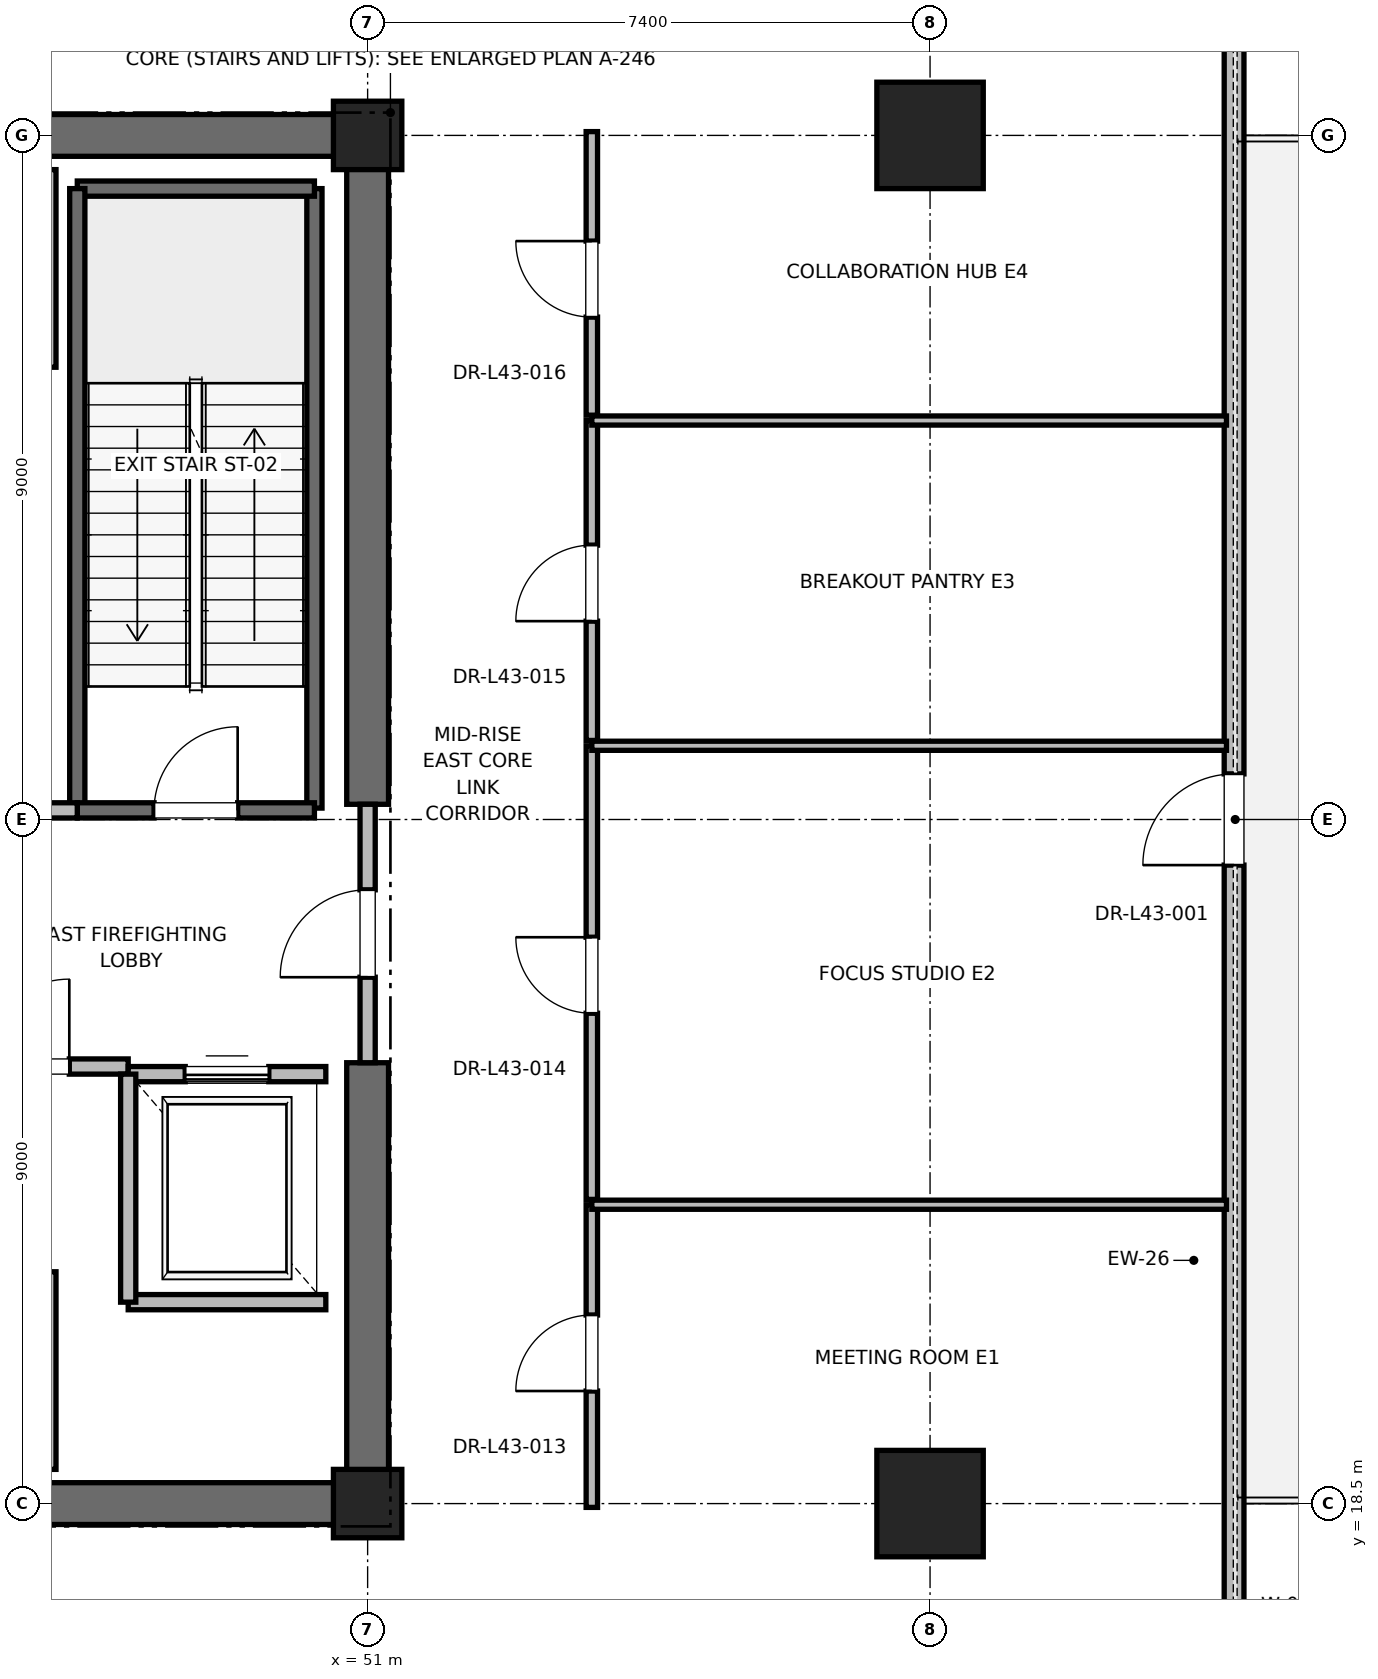
"""IFC4 building model, lengths in metres.
Left out: names, types, materials, properties, quantities, classifications, styles, units other than length and angle.
Written with IfcOpenShell. Run it as: python <this file> out.ifc"""

import sys

from ifc_helpers import new_model, si_unit, direction, frame, frame_2d, origin, origin_2d, place, context, subcontext, project, spatial, rectangle, extrude, element, fill, save


model = new_model("IFC4")
c1 = context("Model", 3, precision=1e-05, world=origin(), true_north=direction((0.0, 1.0)))
c2 = subcontext(c1, "Body", "Model", "MODEL_VIEW")
j1 = project(units=[si_unit("LENGTHUNIT", "METRE"), si_unit("PLANEANGLEUNIT", "RADIAN")], contexts=[c1])
p1 = place(None, origin())
s1 = spatial("IfcSite", under=j1, at=p1, CompositionType="ELEMENT")
p2 = place(p1, origin())
s2 = spatial("IfcBuilding", under=s1, at=p2, CompositionType="ELEMENT")
p3 = place(p2, frame((0.0, 0.0, 184.4)))
s3 = spatial("IfcBuildingStorey", under=s2, at=p3, CompositionType="ELEMENT", Elevation=184.4)
for number, where, z_axis, x_axis in (
    (1, (58.4, 18.5, 0.0), (0.0, 0.0, 1.0), (1.0, 0.0, 0.0)),
    (2, (58.4, 36.5, 0.0), (0.0, 0.0, 1.0), (1.0, 0.0, 0.0)),
):
    element("IfcColumn", number, at=place(p3, frame(where, z_axis=z_axis, x_axis=x_axis)), inside=s3, PredefinedType="COLUMN", context=c2, shape_type="SweptSolid", body=[
        extrude(rectangle(XDim=1.4, YDim=1.4, at=origin_2d()), origin(), (0.0, 0.0, 1.0), 5.0),
    ])
for number, where, z_axis, x_axis in (
    (3, (51.0, 18.5, 0.0), (0.0, 0.0, 1.0), (1.0, 0.0, 0.0)),
    (4, (51.0, 36.5, 0.0), (0.0, 0.0, 1.0), (1.0, 0.0, 0.0)),
):
    element("IfcColumn", number, at=place(p3, frame(where, z_axis=z_axis, x_axis=x_axis)), inside=s3, PredefinedType="PILASTER", context=c2, shape_type="SweptSolid", body=[
        extrude(rectangle(XDim=0.9, YDim=0.9, at=origin_2d()), origin(), (0.0, 0.0, 1.0), 5.0),
    ])
p4 = place(p3, frame((41.8, 18.5, 0.0), z_axis=(0.0, 0.0, 1.0), x_axis=(1.0, 0.0, 0.0)))
e5 = element("IfcWall", 5, at=p4, inside=s3, PredefinedType="SHEAR", context=c2, shape_type="SweptSolid", body=[
    extrude(rectangle(XDim=9.2, YDim=0.55, at=frame_2d((4.6, 0.0))), origin(), (0.0, 0.0, 1.0), 4.7),
])
for number, where, z_axis, x_axis in (
    (6, (45.2, 36.5, 0.0), (0.0, 0.0, 1.0), (1.0, 0.0, 0.0)),
    (7, (51.0, 18.5, 0.0), (0.0, 0.0, 1.0), (0.0, 1.0, 0.0)),
):
    element("IfcWall", number, at=place(p3, frame(where, z_axis=z_axis, x_axis=x_axis)), inside=s3, PredefinedType="SHEAR", context=c2, shape_type="SweptSolid", body=[
        extrude(rectangle(XDim=5.8, YDim=0.55, at=frame_2d((2.9, 0.0))), origin(), (0.0, 0.0, 1.0), 4.7),
    ])
p5 = place(p3, frame((51.0, 27.7, 0.0), z_axis=(0.0, 0.0, 1.0), x_axis=(0.0, 1.0, 0.0)))
e8 = element("IfcWall", 8, at=p5, inside=s3, PredefinedType="SHEAR", context=c2, shape_type="SweptSolid", body=[
    extrude(rectangle(XDim=8.8, YDim=0.55, at=frame_2d((4.4, 0.0))), origin(), (0.0, 0.0, 1.0), 4.7),
])
p6 = place(p3, frame((62.4, 10.3, 0.0), z_axis=(0.0, 0.0, 1.0), x_axis=(0.0, 1.0, 0.0)))
e9 = element("IfcWall", 9, at=p6, inside=s3, PredefinedType="PARAPET", context=c2, shape_type="SweptSolid", body=[
    extrude(rectangle(XDim=34.4, YDim=0.26, at=frame_2d((17.2, 0.0))), origin(), (0.0, 0.0, 1.0), 3.753),
])
p7 = place(p6, frame((4.2, 0.0, 0.85)))
e10 = element("IfcOpeningElement", 10, at=p7, cuts=e9, PredefinedType="OPENING", context=c2, shape_type="SweptSolid", body=[
    extrude(rectangle(XDim=2.0, YDim=2.3, at=frame_2d((1.0, 1.15))), frame((0.0, 0.13, 0.0), z_axis=(0.0, -1.0, 0.0), x_axis=(1.0, 0.0, 0.0)), (0.0, 0.0, 1.0), 0.26),
])
p8 = place(p6, frame((16.6, 0.0, 0.0)))
e11 = element("IfcOpeningElement", 11, at=p8, cuts=e9, PredefinedType="OPENING", context=c2, shape_type="SweptSolid", body=[
    extrude(rectangle(XDim=1.2, YDim=2.2, at=frame_2d((0.6, 1.1))), frame((0.0, 0.13, 0.0), z_axis=(0.0, -1.0, 0.0), x_axis=(1.0, 0.0, 0.0)), (0.0, 0.0, 1.0), 0.26),
])
p9 = place(p6, frame((28.2, 0.0, 0.85)))
e12 = element("IfcOpeningElement", 12, at=p9, cuts=e9, PredefinedType="OPENING", context=c2, shape_type="SweptSolid", body=[
    extrude(rectangle(XDim=2.0, YDim=2.3, at=frame_2d((1.0, 1.15))), frame((0.0, 0.13, 0.0), z_axis=(0.0, -1.0, 0.0), x_axis=(1.0, 0.0, 0.0)), (0.0, 0.0, 1.0), 0.26),
])
p10 = place(p3, frame((50.3, 27.65, 0.0), z_axis=(0.0, 0.0, 1.0), x_axis=(0.0, 1.0, 0.0)))
e13 = element("IfcWall", 13, at=p10, inside=s3, PredefinedType="SOLIDWALL", context=c2, shape_type="SweptSolid", body=[
    extrude(rectangle(XDim=8.15, YDim=0.2, at=frame_2d((4.075, 0.0))), origin(), (0.0, 0.0, 1.0), 4.7),
])
p11 = place(p3, frame((47.18, 35.8, 0.0), z_axis=(0.0, 0.0, 1.0), x_axis=(1.0, 0.0, 0.0)))
e14 = element("IfcWall", 14, at=p11, inside=s3, PredefinedType="SOLIDWALL", context=c2, shape_type="SweptSolid", body=[
    extrude(rectangle(XDim=3.12, YDim=0.2, at=frame_2d((1.56, 0.0))), origin(), (0.0, 0.0, 1.0), 4.7),
])
p12 = place(p3, frame((47.18, 27.62, 0.0), z_axis=(0.0, 0.0, 1.0), x_axis=(0.0, 1.0, 0.0)))
e15 = element("IfcWall", 15, at=p12, inside=s3, PredefinedType="SOLIDWALL", context=c2, shape_type="SweptSolid", body=[
    extrude(rectangle(XDim=8.18, YDim=0.2, at=frame_2d((4.09, 0.0))), origin(), (0.0, 0.0, 1.0), 4.7),
])
p13 = place(p3, frame((47.18, 27.62, 0.0), z_axis=(0.0, 0.0, 1.0), x_axis=(1.0, 0.0, 0.0)))
e16 = element("IfcWall", 16, at=p13, inside=s3, PredefinedType="SOLIDWALL", context=c2, shape_type="SweptSolid", body=[
    extrude(rectangle(XDim=3.12, YDim=0.2, at=frame_2d((1.56, 0.0))), origin(), (0.0, 0.0, 1.0), 4.7),
])
p14 = place(p13, frame((1.01, 0.0, 0.0)))
e17 = element("IfcOpeningElement", 17, at=p14, cuts=e16, PredefinedType="OPENING", context=c2, shape_type="SweptSolid", body=[
    extrude(rectangle(XDim=1.1, YDim=2.15, at=frame_2d((0.55, 1.075))), frame((0.0, 0.1, 0.0), z_axis=(0.0, -1.0, 0.0), x_axis=(1.0, 0.0, 0.0)), (0.0, 0.0, 1.0), 0.2),
])
p15 = place(p3, frame((45.15, 24.25, 0.0), z_axis=(0.0, 0.0, 1.0), x_axis=(1.0, 0.0, 0.0)))
e18 = element("IfcWall", 18, at=p15, inside=s3, PredefinedType="PARTITIONING", context=c2, shape_type="SweptSolid", body=[
    extrude(rectangle(XDim=2.7, YDim=0.2, at=frame_2d((1.35, 0.0))), origin(), (0.0, 0.0, 1.0), 4.7),
])
p16 = place(p15, frame((0.775, 0.0, 0.0)))
e19 = element("IfcOpeningElement", 19, at=p16, cuts=e18, PredefinedType="OPENING", context=c2, shape_type="SweptSolid", body=[
    extrude(rectangle(XDim=1.15, YDim=2.2, at=frame_2d((0.575, 1.1))), frame((0.0, 0.1, 0.0), z_axis=(0.0, -1.0, 0.0), x_axis=(1.0, 0.0, 0.0)), (0.0, 0.0, 1.0), 0.2),
])
p17 = place(p3, frame((45.15, 27.62, 0.0), z_axis=(0.0, 0.0, 1.0), x_axis=(1.0, 0.0, 0.0)))
e20 = element("IfcWall", 20, at=p17, inside=s3, PredefinedType="PARTITIONING", context=c2, shape_type="SweptSolid", body=[
    extrude(rectangle(XDim=2.03, YDim=0.2, at=frame_2d((1.015, 0.0))), origin(), (0.0, 0.0, 1.0), 4.7),
])
p18 = place(p17, frame((0.44, 0.0, 0.0)))
e21 = element("IfcOpeningElement", 21, at=p18, cuts=e20, PredefinedType="OPENING", context=c2, shape_type="SweptSolid", body=[
    extrude(rectangle(XDim=1.15, YDim=2.2, at=frame_2d((0.575, 1.1))), frame((0.0, 0.1, 0.0), z_axis=(0.0, -1.0, 0.0), x_axis=(1.0, 0.0, 0.0)), (0.0, 0.0, 1.0), 0.2),
])
p19 = place(p3, frame((51.0, 24.3, 0.0), z_axis=(0.0, 0.0, 1.0), x_axis=(0.0, 1.0, 0.0)))
e22 = element("IfcWall", 22, at=p19, inside=s3, PredefinedType="PARTITIONING", context=c2, shape_type="SweptSolid", body=[
    extrude(rectangle(XDim=3.4, YDim=0.2, at=frame_2d((1.7, 0.0))), origin(), (0.0, 0.0, 1.0), 3.68),
])
p20 = place(p19, frame((1.125, 0.0, 0.0)))
e23 = element("IfcOpeningElement", 23, at=p20, cuts=e22, PredefinedType="OPENING", context=c2, shape_type="SweptSolid", body=[
    extrude(rectangle(XDim=1.15, YDim=2.2, at=frame_2d((0.575, 1.1))), frame((0.0, 0.1, 0.0), z_axis=(0.0, -1.0, 0.0), x_axis=(1.0, 0.0, 0.0)), (0.0, 0.0, 1.0), 0.2),
])
p21 = place(p3, frame((47.85, 21.15, 0.0), z_axis=(0.0, 0.0, 1.0), x_axis=(1.0, 0.0, 0.0)))
e24 = element("IfcWall", 24, at=p21, inside=s3, PredefinedType="SOLIDWALL", context=c2, shape_type="SweptSolid", body=[
    extrude(rectangle(XDim=2.6, YDim=0.2, at=frame_2d((1.3, 0.0))), origin(), (0.0, 0.0, 1.0), 4.7),
])
p22 = place(p3, frame((50.45, 24.15, 0.0), z_axis=(0.0, 0.0, 1.0), x_axis=(-1.0, 0.0, 0.0)))
e25 = element("IfcWall", 25, at=p22, inside=s3, PredefinedType="SOLIDWALL", context=c2, shape_type="SweptSolid", body=[
    extrude(rectangle(XDim=2.6, YDim=0.2, at=frame_2d((1.3, 0.0))), origin(), (0.0, 0.0, 1.0), 3.68),
])
p23 = place(p22, frame((0.75, 0.0, 0.0)))
e26 = element("IfcOpeningElement", 26, at=p23, cuts=e25, PredefinedType="OPENING", context=c2, shape_type="SweptSolid", body=[
    extrude(rectangle(XDim=1.1, YDim=2.2, at=frame_2d((0.55, 1.1))), frame((0.0, 0.1, 0.0), z_axis=(0.0, -1.0, 0.0), x_axis=(1.0, 0.0, 0.0)), (0.0, 0.0, 1.0), 0.2),
])
p24 = place(p3, frame((47.85, 24.15, 0.0), z_axis=(0.0, 0.0, 1.0), x_axis=(0.0, -1.0, 0.0)))
e27 = element("IfcWall", 27, at=p24, inside=s3, PredefinedType="SOLIDWALL", context=c2, shape_type="SweptSolid", body=[
    extrude(rectangle(XDim=3.0, YDim=0.2, at=frame_2d((1.5, 0.0))), origin(), (0.0, 0.0, 1.0), 4.7),
])
for number, where, z_axis, x_axis in (
    (28, (46.8, 18.95, 0.0), (0.0, 0.0, 1.0), (0.0, 1.0, 0.0)),
    (29, (46.8, 33.45, 0.0), (0.0, 0.0, 1.0), (0.0, 1.0, 0.0)),
):
    element("IfcWall", number, at=place(p3, frame(where, z_axis=z_axis, x_axis=x_axis)), inside=s3, PredefinedType="SOLIDWALL", context=c2, shape_type="SweptSolid", body=[
        extrude(rectangle(XDim=2.6, YDim=0.2, at=frame_2d((1.3, 0.0))), origin(), (0.0, 0.0, 1.0), 4.7),
    ])
p25 = place(p3, frame((53.95, 18.45, 0.0), z_axis=(0.0, 0.0, 1.0), x_axis=(0.0, 1.0, 0.0)))
e30 = element("IfcWall", 30, at=p25, inside=s3, PredefinedType="PARTITIONING", context=c2, shape_type="SweptSolid", body=[
    extrude(rectangle(XDim=3.982, YDim=0.15, at=frame_2d((1.991, 0.0))), origin(), (0.0, 0.0, 1.0), 2.85),
])
p26 = place(p25, frame((1.531, 0.0, 0.0)))
e31 = element("IfcOpeningElement", 31, at=p26, cuts=e30, PredefinedType="OPENING", context=c2, shape_type="SweptSolid", body=[
    extrude(rectangle(XDim=1.0, YDim=2.15, at=frame_2d((0.5, 1.075))), frame((0.0, 0.075, 0.0), z_axis=(0.0, -1.0, 0.0), x_axis=(1.0, 0.0, 0.0)), (0.0, 0.0, 1.0), 0.15),
])
p27 = place(p3, frame((53.95, 22.432, 0.0), z_axis=(0.0, 0.0, 1.0), x_axis=(1.0, 0.0, 0.0)))
e32 = element("IfcWall", 32, at=p27, inside=s3, PredefinedType="PARTITIONING", context=c2, shape_type="SweptSolid", body=[
    extrude(rectangle(XDim=8.35, YDim=0.12, at=frame_2d((4.175, 0.0))), origin(), (0.0, 0.0, 1.0), 2.85),
])
p28 = place(p3, frame((53.95, 22.502, 0.0), z_axis=(0.0, 0.0, 1.0), x_axis=(0.0, 1.0, 0.0)))
e33 = element("IfcWall", 33, at=p28, inside=s3, PredefinedType="PARTITIONING", context=c2, shape_type="SweptSolid", body=[
    extrude(rectangle(XDim=5.968, YDim=0.15, at=frame_2d((2.984, 0.0))), origin(), (0.0, 0.0, 1.0), 2.85),
])
p29 = place(p28, frame((2.449, 0.0, 0.0)))
e34 = element("IfcOpeningElement", 34, at=p29, cuts=e33, PredefinedType="OPENING", context=c2, shape_type="SweptSolid", body=[
    extrude(rectangle(XDim=1.0, YDim=2.15, at=frame_2d((0.5, 1.075))), frame((0.0, 0.075, 0.0), z_axis=(0.0, -1.0, 0.0), x_axis=(1.0, 0.0, 0.0)), (0.0, 0.0, 1.0), 0.15),
])
p30 = place(p3, frame((53.95, 28.47, 0.0), z_axis=(0.0, 0.0, 1.0), x_axis=(1.0, 0.0, 0.0)))
e35 = element("IfcWall", 35, at=p30, inside=s3, PredefinedType="PARTITIONING", context=c2, shape_type="SweptSolid", body=[
    extrude(rectangle(XDim=8.35, YDim=0.12, at=frame_2d((4.175, 0.0))), origin(), (0.0, 0.0, 1.0), 2.85),
])
p31 = place(p3, frame((53.95, 28.54, 0.0), z_axis=(0.0, 0.0, 1.0), x_axis=(0.0, 1.0, 0.0)))
e36 = element("IfcWall", 36, at=p31, inside=s3, PredefinedType="PARTITIONING", context=c2, shape_type="SweptSolid", body=[
    extrude(rectangle(XDim=4.209, YDim=0.15, at=frame_2d((2.104, 0.0))), origin(), (0.0, 0.0, 1.0), 2.85),
])
p32 = place(p31, frame((1.57, 0.0, 0.0)))
e37 = element("IfcOpeningElement", 37, at=p32, cuts=e36, PredefinedType="OPENING", context=c2, shape_type="SweptSolid", body=[
    extrude(rectangle(XDim=1.0, YDim=2.15, at=frame_2d((0.5, 1.075))), frame((0.0, 0.075, 0.0), z_axis=(0.0, -1.0, 0.0), x_axis=(1.0, 0.0, 0.0)), (0.0, 0.0, 1.0), 0.15),
])
p33 = place(p3, frame((53.95, 32.749, 0.0), z_axis=(0.0, 0.0, 1.0), x_axis=(1.0, 0.0, 0.0)))
e38 = element("IfcWall", 38, at=p33, inside=s3, PredefinedType="PARTITIONING", context=c2, shape_type="SweptSolid", body=[
    extrude(rectangle(XDim=8.35, YDim=0.12, at=frame_2d((4.175, 0.0))), origin(), (0.0, 0.0, 1.0), 2.85),
])
p34 = place(p3, frame((53.95, 32.819, 0.0), z_axis=(0.0, 0.0, 1.0), x_axis=(0.0, 1.0, 0.0)))
e39 = element("IfcWall", 39, at=p34, inside=s3, PredefinedType="PARTITIONING", context=c2, shape_type="SweptSolid", body=[
    extrude(rectangle(XDim=3.731, YDim=0.15, at=frame_2d((1.865, 0.0))), origin(), (0.0, 0.0, 1.0), 2.85),
])
p35 = place(p34, frame((1.291, 0.0, 0.0)))
e40 = element("IfcOpeningElement", 40, at=p35, cuts=e39, PredefinedType="OPENING", context=c2, shape_type="SweptSolid", body=[
    extrude(rectangle(XDim=1.0, YDim=2.15, at=frame_2d((0.5, 1.075))), frame((0.0, 0.075, 0.0), z_axis=(0.0, -1.0, 0.0), x_axis=(1.0, 0.0, 0.0)), (0.0, 0.0, 1.0), 0.15),
])
p36 = place(p8, origin())
e41 = element("IfcDoor", 41, at=p36, inside=s3, OperationType="SINGLE_SWING_LEFT", PredefinedType="DOOR", context=c2, shape_type="SweptSolid", body=[
    extrude(rectangle(XDim=1.2, YDim=2.2, at=frame_2d((0.6, 1.1))), frame((0.0, 0.025, 0.0), z_axis=(0.0, -1.0, 0.0), x_axis=(1.0, 0.0, 0.0)), (0.0, 0.0, 1.0), 0.05),
])
fill(e11, e41)
p37 = place(p14, origin())
e42 = element("IfcDoor", 42, at=p37, inside=s3, OperationType="SINGLE_SWING_RIGHT", PredefinedType="DOOR", context=c2, shape_type="SweptSolid", body=[
    extrude(rectangle(XDim=1.1, YDim=2.15, at=frame_2d((0.55, 1.075))), frame((0.0, 0.025, 0.0), z_axis=(0.0, -1.0, 0.0), x_axis=(1.0, 0.0, 0.0)), (0.0, 0.0, 1.0), 0.05),
])
fill(e17, e42)
p38 = place(p16, origin())
e43 = element("IfcDoor", 43, at=p38, inside=s3, OperationType="SINGLE_SWING_RIGHT", PredefinedType="DOOR", context=c2, shape_type="SweptSolid", body=[
    extrude(rectangle(XDim=1.15, YDim=2.2, at=frame_2d((0.575, 1.1))), frame((0.0, 0.025, 0.0), z_axis=(0.0, -1.0, 0.0), x_axis=(1.0, 0.0, 0.0)), (0.0, 0.0, 1.0), 0.05),
])
fill(e19, e43)
p39 = place(p20, origin())
e44 = element("IfcDoor", 44, at=p39, inside=s3, OperationType="SINGLE_SWING_LEFT", PredefinedType="DOOR", context=c2, shape_type="SweptSolid", body=[
    extrude(rectangle(XDim=1.15, YDim=2.2, at=frame_2d((0.575, 1.1))), frame((0.0, 0.025, 0.0), z_axis=(0.0, -1.0, 0.0), x_axis=(1.0, 0.0, 0.0)), (0.0, 0.0, 1.0), 0.05),
])
fill(e23, e44)
p40 = place(p23, origin())
e45 = element("IfcDoor", 45, at=p40, inside=s3, OperationType="SLIDING_TO_RIGHT", PredefinedType="DOOR", context=c2, shape_type="SweptSolid", body=[
    extrude(rectangle(XDim=1.1, YDim=2.2, at=frame_2d((0.55, 1.1))), frame((0.0, 0.025, 0.0), z_axis=(0.0, -1.0, 0.0), x_axis=(1.0, 0.0, 0.0)), (0.0, 0.0, 1.0), 0.05),
])
fill(e26, e45)
p41 = place(p26, origin())
e46 = element("IfcDoor", 46, at=p41, inside=s3, OperationType="SINGLE_SWING_LEFT", PredefinedType="DOOR", context=c2, shape_type="SweptSolid", body=[
    extrude(rectangle(XDim=1.0, YDim=2.15, at=frame_2d((0.5, 1.075))), frame((0.0, 0.025, 0.0), z_axis=(0.0, -1.0, 0.0), x_axis=(1.0, 0.0, 0.0)), (0.0, 0.0, 1.0), 0.05),
])
fill(e31, e46)
p42 = place(p29, origin())
e47 = element("IfcDoor", 47, at=p42, inside=s3, OperationType="SINGLE_SWING_RIGHT", PredefinedType="DOOR", context=c2, shape_type="SweptSolid", body=[
    extrude(rectangle(XDim=1.0, YDim=2.15, at=frame_2d((0.5, 1.075))), frame((0.0, 0.025, 0.0), z_axis=(0.0, -1.0, 0.0), x_axis=(1.0, 0.0, 0.0)), (0.0, 0.0, 1.0), 0.05),
])
fill(e34, e47)
p43 = place(p32, origin())
e48 = element("IfcDoor", 48, at=p43, inside=s3, OperationType="SINGLE_SWING_LEFT", PredefinedType="DOOR", context=c2, shape_type="SweptSolid", body=[
    extrude(rectangle(XDim=1.0, YDim=2.15, at=frame_2d((0.5, 1.075))), frame((0.0, 0.025, 0.0), z_axis=(0.0, -1.0, 0.0), x_axis=(1.0, 0.0, 0.0)), (0.0, 0.0, 1.0), 0.05),
])
fill(e37, e48)
p44 = place(p35, origin())
e49 = element("IfcDoor", 49, at=p44, inside=s3, OperationType="SINGLE_SWING_RIGHT", PredefinedType="DOOR", context=c2, shape_type="SweptSolid", body=[
    extrude(rectangle(XDim=1.0, YDim=2.15, at=frame_2d((0.5, 1.075))), frame((0.0, 0.025, 0.0), z_axis=(0.0, -1.0, 0.0), x_axis=(1.0, 0.0, 0.0)), (0.0, 0.0, 1.0), 0.05),
])
fill(e40, e49)
save(model, sys.argv[1])
